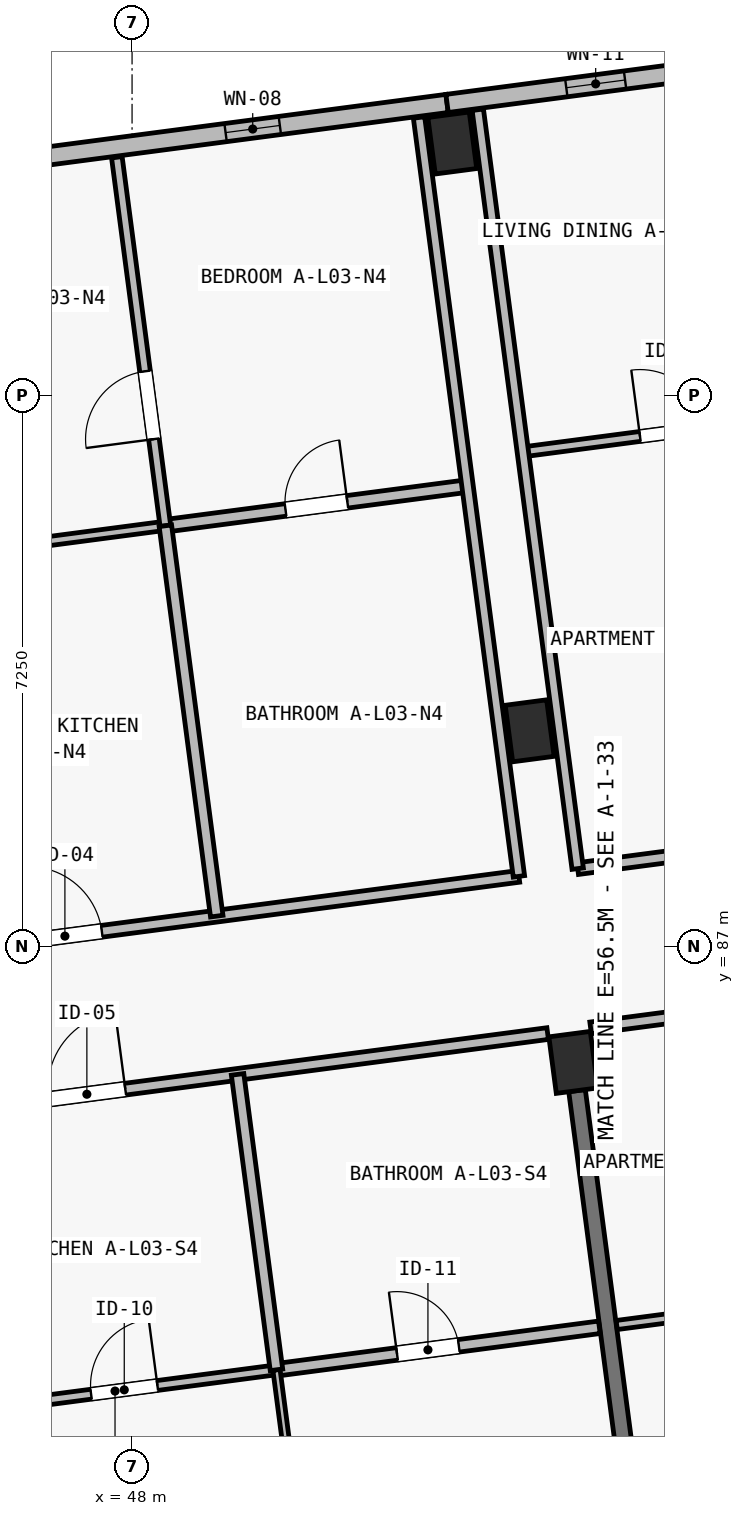
"""IFC4 building model, lengths in metres.
Left out: names, types, materials, properties, quantities, classifications, styles, units other than length and angle.
Written with IfcOpenShell. Run it as: python <this file> out.ifc"""

import sys

from ifc_helpers import new_model, si_unit, direction, frame, frame_2d, origin, origin_2d, place, context, subcontext, project, spatial, rectangle, extrude, element, fill, save


model = new_model("IFC4")
c1 = context("Model", 3, precision=1e-05, world=origin(), true_north=direction((0.0, 1.0)))
c2 = subcontext(c1, "Body", "Model", "MODEL_VIEW")
j1 = project(units=[si_unit("LENGTHUNIT", "METRE"), si_unit("PLANEANGLEUNIT", "RADIAN")], contexts=[c1])
p1 = place(None, origin())
s1 = spatial("IfcSite", under=j1, at=p1, CompositionType="ELEMENT")
p2 = place(p1, origin())
s2 = spatial("IfcBuilding", under=s1, at=p2, CompositionType="ELEMENT")
p3 = place(p2, frame((0.0, 0.0, 11.65)))
s3 = spatial("IfcBuildingStorey", under=s2, at=p3, CompositionType="ELEMENT", Elevation=11.65)
for number, where, z_axis, x_axis in (
    (1, (53.805, 85.476, 0.0), (0.0, 0.0, 1.0), (0.991, 0.131, 0.0)),
    (2, (53.231, 89.839, 0.0), (0.0, 0.0, 1.0), (0.991, 0.131, 0.0)),
    (3, (52.213, 97.572, 0.0), (0.0, 0.0, 1.0), (0.991, 0.131, 0.0)),
):
    element("IfcColumn", number, at=place(p3, frame(where, z_axis=z_axis, x_axis=x_axis)), inside=s3, PredefinedType="COLUMN", context=c2, shape_type="SweptSolid", body=[
        extrude(rectangle(XDim=0.55, YDim=0.75, at=origin_2d()), origin(), (0.0, 0.0, 1.0), 3.25),
    ])
p4 = place(p3, frame((54.775, 78.115, 0.0), z_axis=(0.0, 0.0, 1.0), x_axis=(-0.130519009654, 0.99144580695, 0.0)))
e4 = element("IfcWall", 4, at=p4, inside=s3, PredefinedType="SHEAR", context=c2, shape_type="SweptSolid", body=[
    extrude(rectangle(XDim=7.05, YDim=0.22, at=frame_2d((3.525, 0.0))), origin(), (0.0, 0.0, 1.0), 2.5),
])
p5 = place(p3, frame((43.42, 96.944, 0.0), z_axis=(0.0, 0.0, 1.0), x_axis=(0.991443905089, 0.130533455715, 0.0)))
e5 = element("IfcWall", 5, at=p5, inside=s3, PredefinedType="SOLIDWALL", context=c2, shape_type="SweptSolid", body=[
    extrude(rectangle(XDim=8.8, YDim=0.24, at=frame_2d((4.4, 0.0))), origin(), (0.0, 0.0, 1.0), 3.0),
])
p6 = place(p5, frame((2.241, 0.0, 0.5)))
e6 = element("IfcOpeningElement", 6, at=p6, cuts=e5, PredefinedType="OPENING", context=c2, shape_type="SweptSolid", body=[
    extrude(rectangle(XDim=0.64, YDim=2.18, at=frame_2d((0.32, 1.09))), frame((0.0, 0.135, 0.0), z_axis=(0.0, -1.0, 0.0), x_axis=(1.0, 0.0, 0.0)), (0.0, 0.0, 1.0), 0.27),
])
p7 = place(p5, frame((5.861, 0.0, 0.44)))
e7 = element("IfcOpeningElement", 7, at=p7, cuts=e5, PredefinedType="OPENING", context=c2, shape_type="SweptSolid", body=[
    extrude(rectangle(XDim=0.72, YDim=2.16, at=frame_2d((0.36, 1.08))), frame((0.0, 0.135, 0.0), z_axis=(0.0, -1.0, 0.0), x_axis=(1.0, 0.0, 0.0)), (0.0, 0.0, 1.0), 0.27),
])
p8 = place(p3, frame((52.145, 98.093, 0.0), z_axis=(0.0, 0.0, 1.0), x_axis=(0.991442885224, 0.130541201693, 0.0)))
e8 = element("IfcWall", 8, at=p8, inside=s3, PredefinedType="SOLIDWALL", context=c2, shape_type="SweptSolid", body=[
    extrude(rectangle(XDim=9.325, YDim=0.24, at=frame_2d((4.663, 0.0))), origin(), (0.0, 0.0, 1.0), 3.0),
])
p9 = place(p8, frame((1.582, 0.0, 0.44)))
e9 = element("IfcOpeningElement", 9, at=p9, cuts=e8, PredefinedType="OPENING", context=c2, shape_type="SweptSolid", body=[
    extrude(rectangle(XDim=0.78, YDim=2.2, at=frame_2d((0.39, 1.1))), frame((0.0, 0.135, 0.0), z_axis=(0.0, -1.0, 0.0), x_axis=(1.0, 0.0, 0.0)), (0.0, 0.0, 1.0), 0.27),
])
p10 = place(p8, frame((6.926, 0.0, 0.5)))
e10 = element("IfcOpeningElement", 10, at=p10, cuts=e8, PredefinedType="OPENING", context=c2, shape_type="SweptSolid", body=[
    extrude(rectangle(XDim=0.86, YDim=2.36, at=frame_2d((0.43, 1.18))), frame((0.0, 0.135, 0.0), z_axis=(0.0, -1.0, 0.0), x_axis=(1.0, 0.0, 0.0)), (0.0, 0.0, 1.0), 0.27),
])
p11 = place(p3, frame((45.309, 84.781, 0.0), z_axis=(0.0, 0.0, 1.0), x_axis=(0.991444700604, 0.130527413383, 0.0)))
e11 = element("IfcWall", 11, at=p11, inside=s3, PredefinedType="PARTITIONING", context=c2, shape_type="SweptSolid", body=[
    extrude(rectangle(XDim=8.23, YDim=0.155, at=frame_2d((4.115, 0.0))), origin(), (0.0, 0.0, 1.0), 2.97),
])
p12 = place(p11, frame((1.605, 0.0, 0.0)))
e12 = element("IfcOpeningElement", 12, at=p12, cuts=e11, PredefinedType="OPENING", context=c2, shape_type="SweptSolid", body=[
    extrude(rectangle(XDim=1.02, YDim=2.2, at=frame_2d((0.51, 1.1))), frame((0.0, 0.093, 0.0), z_axis=(0.0, -1.0, 0.0), x_axis=(1.0, 0.0, 0.0)), (0.0, 0.0, 1.0), 0.185),
])
p13 = place(p3, frame((45.652, 80.873, 0.0), z_axis=(0.0, 0.0, 1.0), x_axis=(0.991444014242, 0.130532626667, 0.0)))
e13 = element("IfcWall", 13, at=p13, inside=s3, PredefinedType="PARTITIONING", context=c2, shape_type="SweptSolid", body=[
    extrude(rectangle(XDim=4.285, YDim=0.13, at=frame_2d((2.143, 0.0))), origin(), (0.0, 0.0, 1.0), 2.97),
])
p14 = place(p13, frame((1.825, 0.0, 0.0)))
e14 = element("IfcOpeningElement", 14, at=p14, cuts=e13, PredefinedType="OPENING", context=c2, shape_type="SweptSolid", body=[
    extrude(rectangle(XDim=0.88, YDim=2.1, at=frame_2d((0.44, 1.05))), frame((0.0, 0.08, 0.0), z_axis=(0.0, -1.0, 0.0), x_axis=(1.0, 0.0, 0.0)), (0.0, 0.0, 1.0), 0.16),
])
p15 = place(p3, frame((49.9, 81.432, 0.0), z_axis=(0.0, 0.0, 1.0), x_axis=(0.991444014242, 0.130532626667, 0.0)))
e15 = element("IfcWall", 15, at=p15, inside=s3, PredefinedType="PLUMBINGWALL", context=c2, shape_type="SweptSolid", body=[
    extrude(rectangle(XDim=4.285, YDim=0.165, at=frame_2d((2.143, 0.0))), origin(), (0.0, 0.0, 1.0), 2.97),
])
p16 = place(p15, frame((1.6, 0.0, 0.0)))
e16 = element("IfcOpeningElement", 16, at=p16, cuts=e15, PredefinedType="OPENING", context=c2, shape_type="SweptSolid", body=[
    extrude(rectangle(XDim=0.82, YDim=2.08, at=frame_2d((0.41, 1.04))), frame((0.0, 0.097, 0.0), z_axis=(0.0, -1.0, 0.0), x_axis=(1.0, 0.0, 0.0)), (0.0, 0.0, 1.0), 0.195),
])
p17 = place(p3, frame((50.512, 76.782, 0.0), z_axis=(0.0, 0.0, 1.0), x_axis=(-0.130554157184, 0.991441179315, 0.0)))
e17 = element("IfcWall", 17, at=p17, inside=s3, PredefinedType="PARTITIONING", context=c2, shape_type="SweptSolid", body=[
    extrude(rectangle(XDim=4.69, YDim=0.095, at=frame_2d((2.345, 0.0))), origin(), (0.0, 0.0, 1.0), 2.97),
])
p18 = place(p17, frame((1.35, 0.0, 0.0)))
e18 = element("IfcOpeningElement", 18, at=p18, cuts=e17, PredefinedType="OPENING", context=c2, shape_type="SweptSolid", body=[
    extrude(rectangle(XDim=0.9, YDim=2.1, at=frame_2d((0.45, 1.05))), frame((0.0, 0.062, 0.0), z_axis=(0.0, -1.0, 0.0), x_axis=(1.0, 0.0, 0.0)), (0.0, 0.0, 1.0), 0.125),
])
p19 = place(p3, frame((49.9, 81.432, 0.0), z_axis=(0.0, 0.0, 1.0), x_axis=(-0.130539898676, 0.991443056788, 0.0)))
e19 = element("IfcWall", 19, at=p19, inside=s3, PredefinedType="PLUMBINGWALL", context=c2, shape_type="SweptSolid", body=[
    extrude(rectangle(XDim=3.92, YDim=0.165, at=frame_2d((1.96, 0.0))), origin(), (0.0, 0.0, 1.0), 2.97),
])
p20 = place(p3, frame((54.033, 85.93, 0.0), z_axis=(0.0, 0.0, 1.0), x_axis=(0.991443380249, 0.130537441989, 0.0)))
e20 = element("IfcWall", 20, at=p20, inside=s3, PredefinedType="PARTITIONING", context=c2, shape_type="SweptSolid", body=[
    extrude(rectangle(XDim=8.91, YDim=0.155, at=frame_2d((4.455, 0.0))), origin(), (0.0, 0.0, 1.0), 2.97),
])
p21 = place(p20, frame((1.605, 0.0, 0.0)))
e21 = element("IfcOpeningElement", 21, at=p21, cuts=e20, PredefinedType="OPENING", context=c2, shape_type="SweptSolid", body=[
    extrude(rectangle(XDim=0.98, YDim=2.15, at=frame_2d((0.49, 1.075))), frame((0.0, 0.093, 0.0), z_axis=(0.0, -1.0, 0.0), x_axis=(1.0, 0.0, 0.0)), (0.0, 0.0, 1.0), 0.185),
])
p22 = place(p3, frame((54.376, 82.021, 0.0), z_axis=(0.0, 0.0, 1.0), x_axis=(0.991452356241, 0.130469250419, 0.0)))
e22 = element("IfcWall", 22, at=p22, inside=s3, PredefinedType="PARTITIONING", context=c2, shape_type="SweptSolid", body=[
    extrude(rectangle(XDim=4.285, YDim=0.12, at=frame_2d((2.143, 0.0))), origin(), (0.0, 0.0, 1.0), 2.97),
])
p23 = place(p22, frame((1.825, 0.0, 0.0)))
e23 = element("IfcOpeningElement", 23, at=p23, cuts=e22, PredefinedType="OPENING", context=c2, shape_type="SweptSolid", body=[
    extrude(rectangle(XDim=0.9, YDim=2.1, at=frame_2d((0.45, 1.05))), frame((0.0, 0.075, 0.0), z_axis=(0.0, -1.0, 0.0), x_axis=(1.0, 0.0, 0.0)), (0.0, 0.0, 1.0), 0.15),
])
p24 = place(p3, frame((45.138, 86.877, 0.0), z_axis=(0.0, 0.0, 1.0), x_axis=(0.991444034844, 0.130532470184, 0.0)))
e24 = element("IfcWall", 24, at=p24, inside=s3, PredefinedType="PARTITIONING", context=c2, shape_type="SweptSolid", body=[
    extrude(rectangle(XDim=8.02, YDim=0.155, at=frame_2d((4.01, 0.0))), origin(), (0.0, 0.0, 1.0), 2.97),
])
p25 = place(p24, frame((1.505, 0.0, 0.0)))
e25 = element("IfcOpeningElement", 25, at=p25, cuts=e24, PredefinedType="OPENING", context=c2, shape_type="SweptSolid", body=[
    extrude(rectangle(XDim=0.98, YDim=2.15, at=frame_2d((0.49, 1.075))), frame((0.0, 0.093, 0.0), z_axis=(0.0, -1.0, 0.0), x_axis=(1.0, 0.0, 0.0)), (0.0, 0.0, 1.0), 0.185),
])
p26 = place(p3, frame((44.462, 92.013, 0.0), z_axis=(0.0, 0.0, 1.0), x_axis=(0.991451394038, 0.130476562111, 0.0)))
e26 = element("IfcWall", 26, at=p26, inside=s3, PredefinedType="PARTITIONING", context=c2, shape_type="SweptSolid", body=[
    extrude(rectangle(XDim=4.01, YDim=0.12, at=frame_2d((2.005, 0.0))), origin(), (0.0, 0.0, 1.0), 2.97),
])
p27 = place(p26, frame((1.555, 0.0, 0.0)))
e27 = element("IfcOpeningElement", 27, at=p27, cuts=e26, PredefinedType="OPENING", context=c2, shape_type="SweptSolid", body=[
    extrude(rectangle(XDim=0.9, YDim=2.1, at=frame_2d((0.45, 1.05))), frame((0.0, 0.075, 0.0), z_axis=(0.0, -1.0, 0.0), x_axis=(1.0, 0.0, 0.0)), (0.0, 0.0, 1.0), 0.15),
])
p28 = place(p3, frame((48.438, 92.536, 0.0), z_axis=(0.0, 0.0, 1.0), x_axis=(0.991444553502, 0.130528530716, 0.0)))
e28 = element("IfcWall", 28, at=p28, inside=s3, PredefinedType="PLUMBINGWALL", context=c2, shape_type="SweptSolid", body=[
    extrude(rectangle(XDim=4.01, YDim=0.165, at=frame_2d((2.005, 0.0))), origin(), (0.0, 0.0, 1.0), 2.97),
])
p29 = place(p28, frame((1.595, 0.0, 0.0)))
e29 = element("IfcOpeningElement", 29, at=p29, cuts=e28, PredefinedType="OPENING", context=c2, shape_type="SweptSolid", body=[
    extrude(rectangle(XDim=0.82, YDim=2.08, at=frame_2d((0.41, 1.04))), frame((0.0, 0.097, 0.0), z_axis=(0.0, -1.0, 0.0), x_axis=(1.0, 0.0, 0.0)), (0.0, 0.0, 1.0), 0.195),
])
p30 = place(p3, frame((48.438, 92.536, 0.0), z_axis=(0.0, 0.0, 1.0), x_axis=(-0.130508755558, 0.991447156798, 0.0)))
e30 = element("IfcWall", 30, at=p30, inside=s3, PredefinedType="PARTITIONING", context=c2, shape_type="SweptSolid", body=[
    extrude(rectangle(XDim=4.89, YDim=0.14, at=frame_2d((2.445, 0.0))), origin(), (0.0, 0.0, 1.0), 2.97),
])
p31 = place(p30, frame((1.15, 0.0, 0.0)))
e31 = element("IfcOpeningElement", 31, at=p31, cuts=e30, PredefinedType="OPENING", context=c2, shape_type="SweptSolid", body=[
    extrude(rectangle(XDim=0.9, YDim=2.1, at=frame_2d((0.45, 1.05))), frame((0.0, 0.085, 0.0), z_axis=(0.0, -1.0, 0.0), x_axis=(1.0, 0.0, 0.0)), (0.0, 0.0, 1.0), 0.17),
])
p32 = place(p3, frame((49.114, 87.401, 0.0), z_axis=(0.0, 0.0, 1.0), x_axis=(-0.130558146496, 0.99144065399, 0.0)))
e32 = element("IfcWall", 32, at=p32, inside=s3, PredefinedType="PLUMBINGWALL", context=c2, shape_type="SweptSolid", body=[
    extrude(rectangle(XDim=5.18, YDim=0.165, at=frame_2d((2.59, 0.0))), origin(), (0.0, 0.0, 1.0), 2.97),
])
p33 = place(p3, frame((53.09, 87.924, 0.0), z_axis=(0.0, 0.0, 1.0), x_axis=(-0.130534161944, 0.991443812107, 0.0)))
e33 = element("IfcWall", 33, at=p33, inside=s3, PredefinedType="PARTITIONING", context=c2, shape_type="SweptSolid", body=[
    extrude(rectangle(XDim=10.07, YDim=0.15, at=frame_2d((5.035, 0.0))), origin(), (0.0, 0.0, 1.0), 2.97),
])
p34 = place(p3, frame((53.863, 88.026, 0.0), z_axis=(0.0, 0.0, 1.0), x_axis=(0.991447973994, 0.130502547346, 0.0)))
e34 = element("IfcWall", 34, at=p34, inside=s3, PredefinedType="PARTITIONING", context=c2, shape_type="SweptSolid", body=[
    extrude(rectangle(XDim=8.02, YDim=0.155, at=frame_2d((4.01, 0.0))), origin(), (0.0, 0.0, 1.0), 2.97),
])
p35 = place(p34, frame((1.505, 0.0, 0.0)))
e35 = element("IfcOpeningElement", 35, at=p35, cuts=e34, PredefinedType="OPENING", context=c2, shape_type="SweptSolid", body=[
    extrude(rectangle(XDim=1.02, YDim=2.2, at=frame_2d((0.51, 1.1))), frame((0.0, 0.093, 0.0), z_axis=(0.0, -1.0, 0.0), x_axis=(1.0, 0.0, 0.0)), (0.0, 0.0, 1.0), 0.185),
])
p36 = place(p3, frame((53.141, 93.509, 0.0), z_axis=(0.0, 0.0, 1.0), x_axis=(0.991444553502, 0.130528530716, 0.0)))
e36 = element("IfcWall", 36, at=p36, inside=s3, PredefinedType="PARTITIONING", context=c2, shape_type="SweptSolid", body=[
    extrude(rectangle(XDim=4.01, YDim=0.13, at=frame_2d((2.005, 0.0))), origin(), (0.0, 0.0, 1.0), 2.97),
])
p37 = place(p36, frame((1.555, 0.0, 0.0)))
e37 = element("IfcOpeningElement", 37, at=p37, cuts=e36, PredefinedType="OPENING", context=c2, shape_type="SweptSolid", body=[
    extrude(rectangle(XDim=0.88, YDim=2.1, at=frame_2d((0.44, 1.05))), frame((0.0, 0.08, 0.0), z_axis=(0.0, -1.0, 0.0), x_axis=(1.0, 0.0, 0.0)), (0.0, 0.0, 1.0), 0.16),
])
p38 = place(p3, frame((53.863, 88.026, 0.0), z_axis=(0.0, 0.0, 1.0), x_axis=(-0.130534161944, 0.991443812107, 0.0)))
e38 = element("IfcWall", 38, at=p38, inside=s3, PredefinedType="PARTITIONING", context=c2, shape_type="SweptSolid", body=[
    extrude(rectangle(XDim=10.07, YDim=0.15, at=frame_2d((5.035, 0.0))), origin(), (0.0, 0.0, 1.0), 2.97),
])
p39 = place(p7, origin())
e39 = element("IfcWindow", 39, at=p39, inside=s3, PartitioningType="SINGLE_PANEL", PredefinedType="WINDOW", context=c2, shape_type="SweptSolid", body=[
    extrude(rectangle(XDim=0.72, YDim=2.16, at=frame_2d((0.36, 1.08))), frame((0.0, 0.03, 0.0), z_axis=(0.0, -1.0, 0.0), x_axis=(1.0, 0.0, 0.0)), (0.0, 0.0, 1.0), 0.06),
])
fill(e7, e39)
p40 = place(p9, origin())
e40 = element("IfcWindow", 40, at=p40, inside=s3, PartitioningType="SINGLE_PANEL", PredefinedType="WINDOW", context=c2, shape_type="SweptSolid", body=[
    extrude(rectangle(XDim=0.78, YDim=2.2, at=frame_2d((0.39, 1.1))), frame((0.0, 0.03, 0.0), z_axis=(0.0, -1.0, 0.0), x_axis=(1.0, 0.0, 0.0)), (0.0, 0.0, 1.0), 0.06),
])
fill(e9, e40)
p41 = place(p12, origin())
e41 = element("IfcDoor", 41, at=p41, inside=s3, OperationType="SINGLE_SWING_RIGHT", PredefinedType="DOOR", context=c2, shape_type="SweptSolid", body=[
    extrude(rectangle(XDim=1.02, YDim=2.2, at=frame_2d((0.51, 1.1))), frame((0.0, 0.025, 0.0), z_axis=(0.0, -1.0, 0.0), x_axis=(1.0, 0.0, 0.0)), (0.0, 0.0, 1.0), 0.05),
])
fill(e12, e41)
p42 = place(p14, origin())
e42 = element("IfcDoor", 42, at=p42, inside=s3, OperationType="SINGLE_SWING_RIGHT", PredefinedType="DOOR", context=c2, shape_type="SweptSolid", body=[
    extrude(rectangle(XDim=0.88, YDim=2.1, at=frame_2d((0.44, 1.05))), frame((0.0, 0.025, 0.0), z_axis=(0.0, -1.0, 0.0), x_axis=(1.0, 0.0, 0.0)), (0.0, 0.0, 1.0), 0.05),
])
fill(e14, e42)
p43 = place(p16, origin())
e43 = element("IfcDoor", 43, at=p43, inside=s3, OperationType="SINGLE_SWING_LEFT", PredefinedType="DOOR", context=c2, shape_type="SweptSolid", body=[
    extrude(rectangle(XDim=0.82, YDim=2.08, at=frame_2d((0.41, 1.04))), frame((0.0, 0.025, 0.0), z_axis=(0.0, -1.0, 0.0), x_axis=(1.0, 0.0, 0.0)), (0.0, 0.0, 1.0), 0.05),
])
fill(e16, e43)
p44 = place(p25, origin())
e44 = element("IfcDoor", 44, at=p44, inside=s3, OperationType="SINGLE_SWING_LEFT", PredefinedType="DOOR", context=c2, shape_type="SweptSolid", body=[
    extrude(rectangle(XDim=0.98, YDim=2.15, at=frame_2d((0.49, 1.075))), frame((0.0, 0.025, 0.0), z_axis=(0.0, -1.0, 0.0), x_axis=(1.0, 0.0, 0.0)), (0.0, 0.0, 1.0), 0.05),
])
fill(e25, e44)
p45 = place(p29, origin())
e45 = element("IfcDoor", 45, at=p45, inside=s3, OperationType="SINGLE_SWING_RIGHT", PredefinedType="DOOR", context=c2, shape_type="SweptSolid", body=[
    extrude(rectangle(XDim=0.82, YDim=2.08, at=frame_2d((0.41, 1.04))), frame((0.0, 0.025, 0.0), z_axis=(0.0, -1.0, 0.0), x_axis=(1.0, 0.0, 0.0)), (0.0, 0.0, 1.0), 0.05),
])
fill(e29, e45)
p46 = place(p31, origin())
e46 = element("IfcDoor", 46, at=p46, inside=s3, OperationType="SINGLE_SWING_LEFT", PredefinedType="DOOR", context=c2, shape_type="SweptSolid", body=[
    extrude(rectangle(XDim=0.9, YDim=2.1, at=frame_2d((0.45, 1.05))), frame((0.0, 0.025, 0.0), z_axis=(0.0, -1.0, 0.0), x_axis=(1.0, 0.0, 0.0)), (0.0, 0.0, 1.0), 0.05),
])
fill(e31, e46)
p47 = place(p37, origin())
e47 = element("IfcDoor", 47, at=p47, inside=s3, OperationType="SINGLE_SWING_LEFT", PredefinedType="DOOR", context=c2, shape_type="SweptSolid", body=[
    extrude(rectangle(XDim=0.88, YDim=2.1, at=frame_2d((0.44, 1.05))), frame((0.0, 0.025, 0.0), z_axis=(0.0, -1.0, 0.0), x_axis=(1.0, 0.0, 0.0)), (0.0, 0.0, 1.0), 0.05),
])
fill(e37, e47)
save(model, sys.argv[1])
